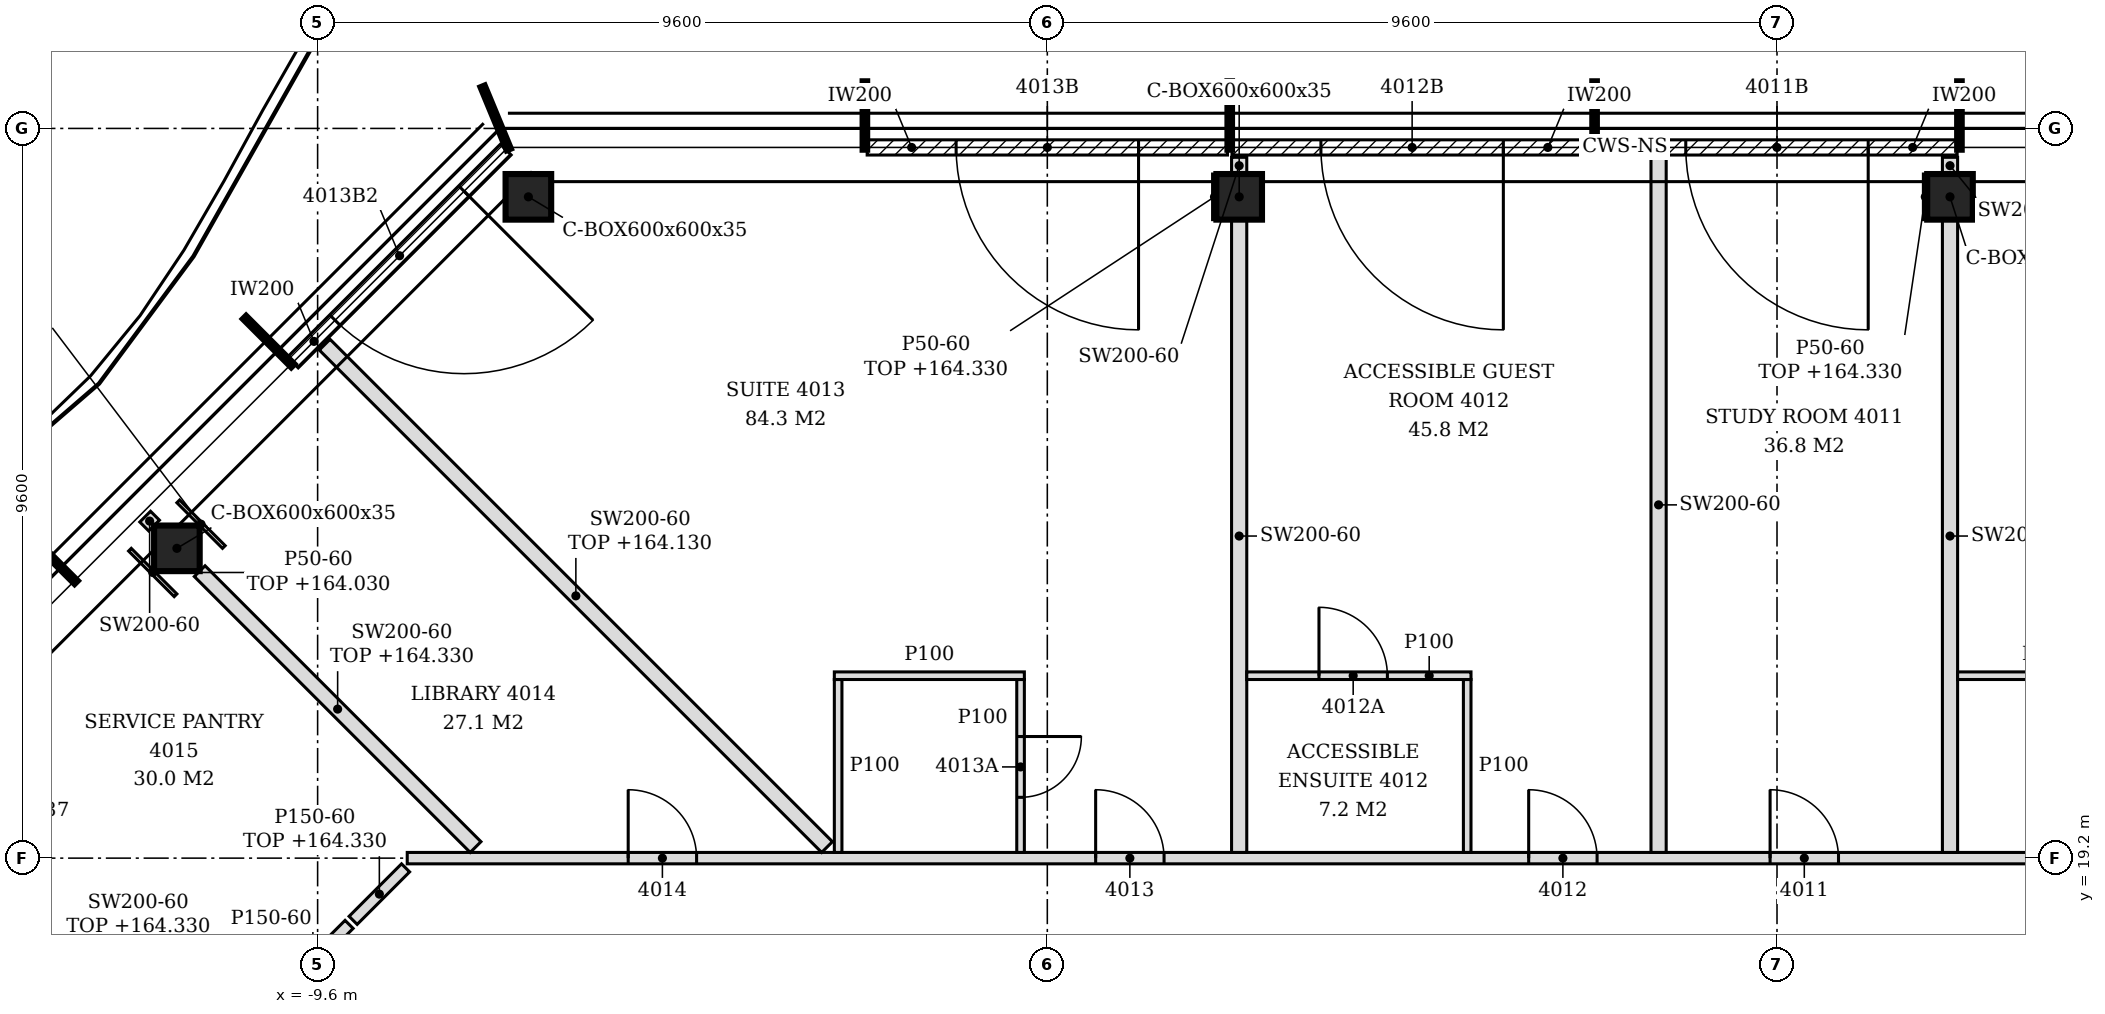
"""IFC4 building model, lengths in metres.
Left out: names, types, materials, properties, quantities, classifications, styles, units other than length and angle.
Written with IfcOpenShell. Run it as: python <this file> out.ifc"""

import sys

from ifc_helpers import new_model, si_unit, direction, frame, frame_2d, origin, origin_2d, place, context, subcontext, project, spatial, polyline, rectangle, hollow_rectangle, outline, extrude, element, fill, save


model = new_model("IFC4")
c1 = context("Model", 3, precision=1e-05, world=origin(), true_north=direction((0.0, 1.0)))
c2 = subcontext(c1, "Body", "Model", "MODEL_VIEW")
j1 = project(units=[si_unit("LENGTHUNIT", "METRE"), si_unit("PLANEANGLEUNIT", "RADIAN")], contexts=[c1])
p1 = place(None, origin())
s1 = spatial("IfcSite", under=j1, at=p1, CompositionType="ELEMENT")
p2 = place(p1, origin())
s2 = spatial("IfcBuilding", under=s1, at=p2, CompositionType="ELEMENT")
p3 = place(p2, frame((0.0, 0.0, 161.4)))
s3 = spatial("IfcBuildingStorey", under=s2, at=p3, CompositionType="ELEMENT", Elevation=161.4)
for number, where, z_axis, x_axis in (
    (1, (11.876, 27.9, -0.15), (0.0, 0.0, 1.0), (1.0, 0.0, 0.0)),
    (2, (2.524, 27.9, -0.15), (0.0, 0.0, 1.0), (1.0, 0.0, 0.0)),
    (3, (-6.827, 27.9, -0.15), (0.0, 0.0, 1.0), (1.0, 0.0, 0.0)),
    (4, (-11.451, 23.276, -0.15), (0.0, 0.0, 1.0), (1.0, 0.0, 0.0)),
):
    element("IfcColumn", number, at=place(p3, frame(where, z_axis=z_axis, x_axis=x_axis)), inside=s3, PredefinedType="COLUMN", context=c2, shape_type="SweptSolid", body=[
        extrude(hollow_rectangle(XDim=0.6, YDim=0.6, WallThickness=0.035, at=origin_2d()), origin(), (0.0, 0.0, 1.0), 3.6),
    ])
p4 = place(p3, frame((11.97, 28.55, 0.0), z_axis=(0.0, 0.0, 1.0), x_axis=(-1.0, 0.0, 0.0)))
e5 = element("IfcWall", 5, at=p4, inside=s3, PredefinedType="NOTDEFINED", context=c2, shape_type="SweptSolid", body=[
    extrude(rectangle(XDim=4.74, YDim=0.2, at=frame_2d((2.37, 0.0))), origin(), (0.0, 0.0, 1.0), 3.45),
])
p5 = place(p4, frame((1.17, 0.0, 0.0)))
e6 = element("IfcOpeningElement", 6, at=p5, cuts=e5, PredefinedType="OPENING", context=c2, shape_type="SweptSolid", body=[
    extrude(rectangle(XDim=2.4, YDim=2.4, at=frame_2d((1.2, 1.2))), frame((0.0, 0.11, 0.0), z_axis=(0.0, -1.0, 0.0), x_axis=(1.0, 0.0, 0.0)), (0.0, 0.0, 1.0), 0.22),
])
p6 = place(p3, frame((7.17, 28.55, 0.0), z_axis=(0.0, 0.0, 1.0), x_axis=(-1.0, 0.0, 0.0)))
e7 = element("IfcWall", 7, at=p6, inside=s3, PredefinedType="NOTDEFINED", context=c2, shape_type="SweptSolid", body=[
    extrude(rectangle(XDim=4.74, YDim=0.2, at=frame_2d((2.37, 0.0))), origin(), (0.0, 0.0, 1.0), 3.45),
])
p7 = place(p6, frame((1.17, 0.0, 0.0)))
e8 = element("IfcOpeningElement", 8, at=p7, cuts=e7, PredefinedType="OPENING", context=c2, shape_type="SweptSolid", body=[
    extrude(rectangle(XDim=2.4, YDim=2.4, at=frame_2d((1.2, 1.2))), frame((0.0, 0.11, 0.0), z_axis=(0.0, -1.0, 0.0), x_axis=(1.0, 0.0, 0.0)), (0.0, 0.0, 1.0), 0.22),
])
p8 = place(p3, frame((2.37, 28.55, 0.0), z_axis=(0.0, 0.0, 1.0), x_axis=(-1.0, 0.0, 0.0)))
e9 = element("IfcWall", 9, at=p8, inside=s3, PredefinedType="NOTDEFINED", context=c2, shape_type="SweptSolid", body=[
    extrude(rectangle(XDim=4.74, YDim=0.2, at=frame_2d((2.37, 0.0))), origin(), (0.0, 0.0, 1.0), 3.45),
])
p9 = place(p8, frame((1.17, 0.0, 0.0)))
e10 = element("IfcOpeningElement", 10, at=p9, cuts=e9, PredefinedType="OPENING", context=c2, shape_type="SweptSolid", body=[
    extrude(rectangle(XDim=2.4, YDim=2.4, at=frame_2d((1.2, 1.2))), frame((0.0, 0.11, 0.0), z_axis=(0.0, -1.0, 0.0), x_axis=(1.0, 0.0, 0.0)), (0.0, 0.0, 1.0), 0.22),
])
p10 = place(p3, frame((-7.125, 28.522, 0.0), z_axis=(0.0, 0.0, 1.0), x_axis=(-0.707106781187, -0.707106781187, 0.0)))
e11 = element("IfcWall", 11, at=p10, inside=s3, PredefinedType="NOTDEFINED", context=c2, shape_type="SweptSolid", body=[
    extrude(rectangle(XDim=3.962, YDim=0.2, at=frame_2d((1.981, 0.0))), origin(), (0.0, 0.0, 1.0), 3.45),
])
p11 = place(p10, frame((0.775, 0.0, 0.0)))
e12 = element("IfcOpeningElement", 12, at=p11, cuts=e11, PredefinedType="OPENING", context=c2, shape_type="SweptSolid", body=[
    extrude(rectangle(XDim=2.4, YDim=2.4, at=frame_2d((1.2, 1.2))), frame((0.0, 0.11, 0.0), z_axis=(0.0, -1.0, 0.0), x_axis=(1.0, 0.0, 0.0)), (0.0, 0.0, 1.0), 0.22),
])
p12 = place(p3, frame((-11.357, 16.157, 0.0), z_axis=(0.0, 0.0, 1.0), x_axis=(0.707106781187, 0.707106781187, 0.0)))
e13 = element("IfcWall", 13, at=p12, inside=s3, PredefinedType="PARTITIONING", context=c2, shape_type="SweptSolid", body=[
    extrude(rectangle(XDim=3.071, YDim=0.15, at=frame_2d((1.535, 0.0))), origin(), (0.0, 0.0, 1.0), 3.45),
])
p13 = place(p12, frame((0.823, 0.0, 0.0)))
e14 = element("IfcOpeningElement", 14, at=p13, cuts=e13, PredefinedType="OPENING", context=c2, shape_type="SweptSolid", body=[
    extrude(rectangle(XDim=0.9, YDim=2.1, at=frame_2d((0.45, 1.05))), frame((0.0, 0.085, 0.0), z_axis=(0.0, -1.0, 0.0), x_axis=(1.0, 0.0, 0.0)), (0.0, 0.0, 1.0), 0.17),
])
p14 = place(p3, frame((-11.41, 16.21, 0.0), z_axis=(0.0, 0.0, 1.0), x_axis=(-0.707106781187, 0.707106781187, 0.0)))
e15 = element("IfcWall", 15, at=p14, inside=s3, PredefinedType="PARTITIONING", context=c2, shape_type="SweptSolid", body=[
    extrude(rectangle(XDim=3.948, YDim=0.2, at=frame_2d((1.974, 0.0))), origin(), (0.0, 0.0, 1.0), 2.93),
])
p15 = place(p3, frame((-9.133, 18.381, 0.0), z_axis=(0.0, 0.0, 1.0), x_axis=(0.706731558776, 0.707481804593, 0.0)))
e16 = element("IfcWall", 16, at=p15, inside=s3, PredefinedType="PARTITIONING", context=c2, shape_type="SweptSolid", body=[
    extrude(rectangle(XDim=0.976, YDim=0.15, at=frame_2d((0.488, 0.0))), origin(), (0.0, 0.0, 1.0), 2.93),
])
p16 = place(p3, frame((-8.421, 19.2, 0.0), z_axis=(0.0, 0.0, 1.0), x_axis=(1.0, 0.0, 0.0)))
e17 = element("IfcWall", 17, at=p16, inside=s3, PredefinedType="PARTITIONING", context=c2, shape_type="SweptSolid", body=[
    extrude(outline(polyline([(0.0, 0.0), (31.242, 0.0), (31.242, 2.88), (27.771, 2.88), (27.769, 2.73), (27.471, 2.73), (27.469, 2.88), (15.771, 2.88), (15.769, 2.73), (15.471, 2.73), (15.469, 2.88), (3.771, 2.88), (3.769, 2.73), (3.471, 2.73), (3.469, 2.88), (0.0, 2.88), (0.0, 0.0)])), frame((0.0, 0.075, 0.0), z_axis=(0.0, -1.0, 0.0), x_axis=(1.0, 0.0, 0.0)), (0.0, 0.0, 1.0), 0.15),
])
p17 = place(p16, frame((25.997, 0.0, 0.0)))
e18 = element("IfcOpeningElement", 18, at=p17, cuts=e17, PredefinedType="OPENING", context=c2, shape_type="SweptSolid", body=[
    extrude(rectangle(XDim=0.9, YDim=2.1, at=frame_2d((0.45, 1.05))), frame((0.0, 0.085, 0.0), z_axis=(0.0, -1.0, 0.0), x_axis=(1.0, 0.0, 0.0)), (0.0, 0.0, 1.0), 0.17),
])
p18 = place(p16, frame((17.93, 0.0, 0.0)))
e19 = element("IfcOpeningElement", 19, at=p18, cuts=e17, PredefinedType="OPENING", context=c2, shape_type="SweptSolid", body=[
    extrude(rectangle(XDim=0.9, YDim=2.1, at=frame_2d((0.45, 1.05))), frame((0.0, 0.085, 0.0), z_axis=(0.0, -1.0, 0.0), x_axis=(1.0, 0.0, 0.0)), (0.0, 0.0, 1.0), 0.17),
])
p19 = place(p16, frame((14.754, 0.0, 0.0)))
e20 = element("IfcOpeningElement", 20, at=p19, cuts=e17, PredefinedType="OPENING", context=c2, shape_type="SweptSolid", body=[
    extrude(rectangle(XDim=0.9, YDim=2.1, at=frame_2d((0.45, 1.05))), frame((0.0, 0.085, 0.0), z_axis=(0.0, -1.0, 0.0), x_axis=(1.0, 0.0, 0.0)), (0.0, 0.0, 1.0), 0.17),
])
p20 = place(p16, frame((9.057, 0.0, 0.0)))
e21 = element("IfcOpeningElement", 21, at=p20, cuts=e17, PredefinedType="OPENING", context=c2, shape_type="SweptSolid", body=[
    extrude(rectangle(XDim=0.9, YDim=2.1, at=frame_2d((0.45, 1.05))), frame((0.0, 0.085, 0.0), z_axis=(0.0, -1.0, 0.0), x_axis=(1.0, 0.0, 0.0)), (0.0, 0.0, 1.0), 0.17),
])
p21 = place(p16, frame((2.907, 0.0, 0.0)))
e22 = element("IfcOpeningElement", 22, at=p21, cuts=e17, PredefinedType="OPENING", context=c2, shape_type="SweptSolid", body=[
    extrude(rectangle(XDim=0.9, YDim=2.1, at=frame_2d((0.45, 1.05))), frame((0.0, 0.085, 0.0), z_axis=(0.0, -1.0, 0.0), x_axis=(1.0, 0.0, 0.0)), (0.0, 0.0, 1.0), 0.17),
])
p22 = place(p3, frame((-7.522, 19.346, 0.0), z_axis=(0.0, 0.0, 1.0), x_axis=(-0.707106781187, 0.707106781187, 0.0)))
e23 = element("IfcWall", 23, at=p22, inside=s3, PredefinedType="PARTITIONING", context=c2, shape_type="SweptSolid", body=[
    extrude(rectangle(XDim=5.134, YDim=0.2, at=frame_2d((2.567, 0.0))), origin(), (0.0, 0.0, 1.0), 2.93),
])
p23 = place(p3, frame((-2.898, 19.346, 0.0), z_axis=(0.0, 0.0, 1.0), x_axis=(-0.707106781187, 0.707106781187, 0.0)))
e24 = element("IfcWall", 24, at=p23, inside=s3, PredefinedType="PARTITIONING", context=c2, shape_type="SweptSolid", body=[
    extrude(rectangle(XDim=9.347, YDim=0.2, at=frame_2d((4.674, 0.0))), origin(), (0.0, 0.0, 1.0), 2.73),
])
p24 = place(p3, frame((-2.752, 19.275, 0.0), z_axis=(0.0, 0.0, 1.0), x_axis=(0.0, 1.0, 0.0)))
e25 = element("IfcWall", 25, at=p24, inside=s3, PredefinedType="PARTITIONING", context=c2, shape_type="SweptSolid", body=[
    extrude(outline(polyline([(0.0, 0.0), (2.275, 0.0), (2.275, 3.45), (0.03, 3.45), (0.028, 2.88), (0.0, 2.88), (0.0, 0.0)])), frame((0.0, 0.05, 0.0), z_axis=(0.0, -1.0, 0.0), x_axis=(1.0, 0.0, 0.0)), (0.0, 0.0, 1.0), 0.1),
])
p25 = place(p3, frame((-0.352, 19.275, 0.0), z_axis=(0.0, 0.0, 1.0), x_axis=(0.0, 1.0, 0.0)))
e26 = element("IfcWall", 26, at=p25, inside=s3, PredefinedType="PARTITIONING", context=c2, shape_type="SweptSolid", body=[
    extrude(outline(polyline([(0.0, 0.0), (2.275, 0.0), (2.275, 3.45), (0.03, 3.45), (0.028, 2.88), (0.0, 2.88), (0.0, 0.0)])), frame((0.0, 0.05, 0.0), z_axis=(0.0, -1.0, 0.0), x_axis=(1.0, 0.0, 0.0)), (0.0, 0.0, 1.0), 0.1),
])
p26 = place(p25, frame((0.725, 0.0, 0.0)))
e27 = element("IfcOpeningElement", 27, at=p26, cuts=e26, PredefinedType="OPENING", context=c2, shape_type="SweptSolid", body=[
    extrude(rectangle(XDim=0.8, YDim=2.1, at=frame_2d((0.4, 1.05))), frame((0.0, 0.06, 0.0), z_axis=(0.0, -1.0, 0.0), x_axis=(1.0, 0.0, 0.0)), (0.0, 0.0, 1.0), 0.12),
])
p27 = place(p3, frame((2.524, 19.275, 0.0), z_axis=(0.0, 0.0, 1.0), x_axis=(0.0, 1.0, 0.0)))
e28 = element("IfcWall", 28, at=p27, inside=s3, PredefinedType="PARTITIONING", context=c2, shape_type="SweptSolid", body=[
    extrude(outline(polyline([(0.0, 0.0), (8.325, 0.0), (8.325, 3.45), (4.83, 3.45), (4.828, 2.88), (4.62, 2.88), (4.618, 3.45), (0.03, 3.45), (0.028, 2.88), (0.0, 2.88), (0.0, 0.0)])), frame((0.0, 0.1, 0.0), z_axis=(0.0, -1.0, 0.0), x_axis=(1.0, 0.0, 0.0)), (0.0, 0.0, 1.0), 0.2),
])
p28 = place(p3, frame((5.524, 19.275, 0.0), z_axis=(0.0, 0.0, 1.0), x_axis=(0.0, 1.0, 0.0)))
e29 = element("IfcWall", 29, at=p28, inside=s3, PredefinedType="PARTITIONING", context=c2, shape_type="SweptSolid", body=[
    extrude(outline(polyline([(0.0, 0.0), (2.275, 0.0), (2.275, 3.45), (0.03, 3.45), (0.028, 2.88), (0.0, 2.88), (0.0, 0.0)])), frame((0.0, 0.05, 0.0), z_axis=(0.0, -1.0, 0.0), x_axis=(1.0, 0.0, 0.0)), (0.0, 0.0, 1.0), 0.1),
])
p29 = place(p3, frame((8.042, 19.275, 0.0), z_axis=(0.0, 0.0, 1.0), x_axis=(0.0, 1.0, 0.0)))
e30 = element("IfcWall", 30, at=p29, inside=s3, PredefinedType="PARTITIONING", context=c2, shape_type="SweptSolid", body=[
    extrude(outline(polyline([(0.0, 0.0), (9.145, 0.0), (9.145, 3.45), (8.775, 3.45), (8.773, 2.93), (8.475, 2.93), (8.473, 3.45), (4.83, 3.45), (4.828, 2.88), (4.62, 2.88), (4.618, 3.45), (0.03, 3.45), (0.028, 2.88), (0.0, 2.88), (0.0, 0.0)])), frame((0.0, 0.1, 0.0), z_axis=(0.0, -1.0, 0.0), x_axis=(1.0, 0.0, 0.0)), (0.0, 0.0, 1.0), 0.2),
])
p30 = place(p3, frame((11.876, 19.275, 0.0), z_axis=(0.0, 0.0, 1.0), x_axis=(0.0, 1.0, 0.0)))
e31 = element("IfcWall", 31, at=p30, inside=s3, PredefinedType="PARTITIONING", context=c2, shape_type="SweptSolid", body=[
    extrude(outline(polyline([(0.0, 0.0), (8.325, 0.0), (8.325, 3.45), (4.83, 3.45), (4.828, 2.88), (4.62, 2.88), (4.618, 3.45), (0.03, 3.45), (0.028, 2.88), (0.0, 2.88), (0.0, 0.0)])), frame((0.0, 0.1, 0.0), z_axis=(0.0, -1.0, 0.0), x_axis=(1.0, 0.0, 0.0)), (0.0, 0.0, 1.0), 0.2),
])
p31 = place(p3, frame((-2.802, 21.6, 0.0), z_axis=(0.0, 0.0, 1.0), x_axis=(1.0, 0.0, 0.0)))
e32 = element("IfcWall", 32, at=p31, inside=s3, PredefinedType="PARTITIONING", context=c2, shape_type="SweptSolid", body=[
    extrude(rectangle(XDim=2.5, YDim=0.1, at=frame_2d((1.25, 0.0))), origin(), (0.0, 0.0, 1.0), 3.45),
])
p32 = place(p3, frame((2.624, 21.6, 0.0), z_axis=(0.0, 0.0, 1.0), x_axis=(1.0, 0.0, 0.0)))
e33 = element("IfcWall", 33, at=p32, inside=s3, PredefinedType="PARTITIONING", context=c2, shape_type="SweptSolid", body=[
    extrude(rectangle(XDim=2.95, YDim=0.1, at=frame_2d((1.475, 0.0))), origin(), (0.0, 0.0, 1.0), 3.45),
])
p33 = place(p32, frame((0.95, 0.0, 0.0)))
e34 = element("IfcOpeningElement", 34, at=p33, cuts=e33, PredefinedType="OPENING", context=c2, shape_type="SweptSolid", body=[
    extrude(rectangle(XDim=0.9, YDim=2.1, at=frame_2d((0.45, 1.05))), frame((0.0, 0.06, 0.0), z_axis=(0.0, -1.0, 0.0), x_axis=(1.0, 0.0, 0.0)), (0.0, 0.0, 1.0), 0.12),
])
p34 = place(p3, frame((11.976, 21.6, 0.0), z_axis=(0.0, 0.0, 1.0), x_axis=(1.0, 0.0, 0.0)))
e35 = element("IfcWall", 35, at=p34, inside=s3, PredefinedType="PARTITIONING", context=c2, shape_type="SweptSolid", body=[
    extrude(rectangle(XDim=2.35, YDim=0.1, at=frame_2d((1.175, 0.0))), origin(), (0.0, 0.0, 1.0), 3.45),
])
p35 = place(p3, frame((-11.752, 23.576, 0.0), z_axis=(0.0, 0.0, 1.0), x_axis=(-0.707106781187, 0.707106781187, 0.0)))
e36 = element("IfcWall", 36, at=p35, inside=s3, PredefinedType="PARTITIONING", context=c2, shape_type="SweptSolid", body=[
    extrude(rectangle(XDim=0.166, YDim=0.2, at=frame_2d((0.083, 0.0))), origin(), (0.0, 0.0, 1.0), 3.45),
])
for number, where, z_axis, x_axis in (
    (37, (2.524, 28.2, 0.0), (0.0, 0.0, 1.0), (0.0, 1.0, 0.0)),
    (38, (11.876, 28.2, 0.0), (0.0, 0.0, 1.0), (0.0, 1.0, 0.0)),
):
    element("IfcWall", number, at=place(p3, frame(where, z_axis=z_axis, x_axis=x_axis)), inside=s3, PredefinedType="PARTITIONING", context=c2, shape_type="SweptSolid", body=[
        extrude(rectangle(XDim=0.22, YDim=0.2, at=frame_2d((0.11, 0.0))), origin(), (0.0, 0.0, 1.0), 3.45),
    ])
p36 = place(p3, frame((-11.469, 22.658, 0.0), z_axis=(0.0, 0.0, 1.0), x_axis=(-0.706962899457, 0.707250633645, 0.0)))
e39 = element("IfcWall", 39, at=p36, inside=s3, PredefinedType="PARTITIONING", context=c2, shape_type="SweptSolid", body=[
    extrude(rectangle(XDim=0.848, YDim=0.05, at=frame_2d((0.424, 0.0))), origin(), (0.0, 0.0, 1.0), 2.63),
])
p37 = place(p3, frame((-10.834, 23.293, 0.0), z_axis=(0.0, 0.0, 1.0), x_axis=(-0.707250633645, 0.706962899457, 0.0)))
e40 = element("IfcWall", 40, at=p37, inside=s3, PredefinedType="PARTITIONING", context=c2, shape_type="SweptSolid", body=[
    extrude(rectangle(XDim=0.848, YDim=0.05, at=frame_2d((0.424, 0.0))), origin(), (0.0, 0.0, 1.0), 2.93),
])
for number, where, z_axis, x_axis in (
    (41, (2.199, 27.6, 0.0), (0.0, 0.0, 1.0), (0.0, 1.0, 0.0)),
    (42, (11.551, 27.6, 0.0), (0.0, 0.0, 1.0), (0.0, 1.0, 0.0)),
):
    element("IfcWall", number, at=place(p3, frame(where, z_axis=z_axis, x_axis=x_axis)), inside=s3, PredefinedType="PARTITIONING", context=c2, shape_type="SweptSolid", body=[
        extrude(rectangle(XDim=0.6, YDim=0.05, at=frame_2d((0.3, 0.0))), origin(), (0.0, 0.0, 1.0), 2.93),
    ])
p38 = place(p5, origin())
e43 = element("IfcDoor", 43, at=p38, inside=s3, OperationType="SINGLE_SWING_LEFT", PredefinedType="DOOR", context=c2, shape_type="SweptSolid", body=[
    extrude(rectangle(XDim=2.4, YDim=2.4, at=frame_2d((1.2, 1.2))), frame((0.0, 0.025, 0.0), z_axis=(0.0, -1.0, 0.0), x_axis=(1.0, 0.0, 0.0)), (0.0, 0.0, 1.0), 0.05),
])
fill(e6, e43)
p39 = place(p7, origin())
e44 = element("IfcDoor", 44, at=p39, inside=s3, OperationType="SINGLE_SWING_LEFT", PredefinedType="DOOR", context=c2, shape_type="SweptSolid", body=[
    extrude(rectangle(XDim=2.4, YDim=2.4, at=frame_2d((1.2, 1.2))), frame((0.0, 0.025, 0.0), z_axis=(0.0, -1.0, 0.0), x_axis=(1.0, 0.0, 0.0)), (0.0, 0.0, 1.0), 0.05),
])
fill(e8, e44)
p40 = place(p9, origin())
e45 = element("IfcDoor", 45, at=p40, inside=s3, OperationType="SINGLE_SWING_LEFT", PredefinedType="DOOR", context=c2, shape_type="SweptSolid", body=[
    extrude(rectangle(XDim=2.4, YDim=2.4, at=frame_2d((1.2, 1.2))), frame((0.0, 0.025, 0.0), z_axis=(0.0, -1.0, 0.0), x_axis=(1.0, 0.0, 0.0)), (0.0, 0.0, 1.0), 0.05),
])
fill(e10, e45)
p41 = place(p11, origin())
e46 = element("IfcDoor", 46, at=p41, inside=s3, OperationType="SINGLE_SWING_LEFT", PredefinedType="DOOR", context=c2, shape_type="SweptSolid", body=[
    extrude(rectangle(XDim=2.4, YDim=2.4, at=frame_2d((1.2, 1.2))), frame((0.0, 0.025, 0.0), z_axis=(0.0, -1.0, 0.0), x_axis=(1.0, 0.0, 0.0)), (0.0, 0.0, 1.0), 0.05),
])
fill(e12, e46)
p42 = place(p18, origin())
e47 = element("IfcDoor", 47, at=p42, inside=s3, OperationType="SINGLE_SWING_LEFT", PredefinedType="DOOR", context=c2, shape_type="SweptSolid", body=[
    extrude(rectangle(XDim=0.9, YDim=2.1, at=frame_2d((0.45, 1.05))), frame((0.0, 0.025, 0.0), z_axis=(0.0, -1.0, 0.0), x_axis=(1.0, 0.0, 0.0)), (0.0, 0.0, 1.0), 0.05),
])
fill(e19, e47)
p43 = place(p19, origin())
e48 = element("IfcDoor", 48, at=p43, inside=s3, OperationType="SINGLE_SWING_LEFT", PredefinedType="DOOR", context=c2, shape_type="SweptSolid", body=[
    extrude(rectangle(XDim=0.9, YDim=2.1, at=frame_2d((0.45, 1.05))), frame((0.0, 0.025, 0.0), z_axis=(0.0, -1.0, 0.0), x_axis=(1.0, 0.0, 0.0)), (0.0, 0.0, 1.0), 0.05),
])
fill(e20, e48)
p44 = place(p33, origin())
e49 = element("IfcDoor", 49, at=p44, inside=s3, OperationType="SINGLE_SWING_LEFT", PredefinedType="DOOR", context=c2, shape_type="SweptSolid", body=[
    extrude(rectangle(XDim=0.9, YDim=2.1, at=frame_2d((0.45, 1.05))), frame((0.0, 0.025, 0.0), z_axis=(0.0, -1.0, 0.0), x_axis=(1.0, 0.0, 0.0)), (0.0, 0.0, 1.0), 0.05),
])
fill(e34, e49)
p45 = place(p20, origin())
e50 = element("IfcDoor", 50, at=p45, inside=s3, OperationType="SINGLE_SWING_LEFT", PredefinedType="DOOR", context=c2, shape_type="SweptSolid", body=[
    extrude(rectangle(XDim=0.9, YDim=2.1, at=frame_2d((0.45, 1.05))), frame((0.0, 0.025, 0.0), z_axis=(0.0, -1.0, 0.0), x_axis=(1.0, 0.0, 0.0)), (0.0, 0.0, 1.0), 0.05),
])
fill(e21, e50)
p46 = place(p26, frame((0.8, 0.0, 0.0), z_axis=(0.0, 0.0, 1.0), x_axis=(-1.0, 0.0, 0.0)))
e51 = element("IfcDoor", 51, at=p46, inside=s3, OperationType="SINGLE_SWING_LEFT", PredefinedType="DOOR", context=c2, shape_type="SweptSolid", body=[
    extrude(rectangle(XDim=0.8, YDim=2.1, at=frame_2d((0.4, 1.05))), frame((0.0, 0.025, 0.0), z_axis=(0.0, -1.0, 0.0), x_axis=(1.0, 0.0, 0.0)), (0.0, 0.0, 1.0), 0.05),
])
fill(e27, e51)
p47 = place(p21, origin())
e52 = element("IfcDoor", 52, at=p47, inside=s3, OperationType="SINGLE_SWING_LEFT", PredefinedType="DOOR", context=c2, shape_type="SweptSolid", body=[
    extrude(rectangle(XDim=0.9, YDim=2.1, at=frame_2d((0.45, 1.05))), frame((0.0, 0.025, 0.0), z_axis=(0.0, -1.0, 0.0), x_axis=(1.0, 0.0, 0.0)), (0.0, 0.0, 1.0), 0.05),
])
fill(e22, e52)
save(model, sys.argv[1])
